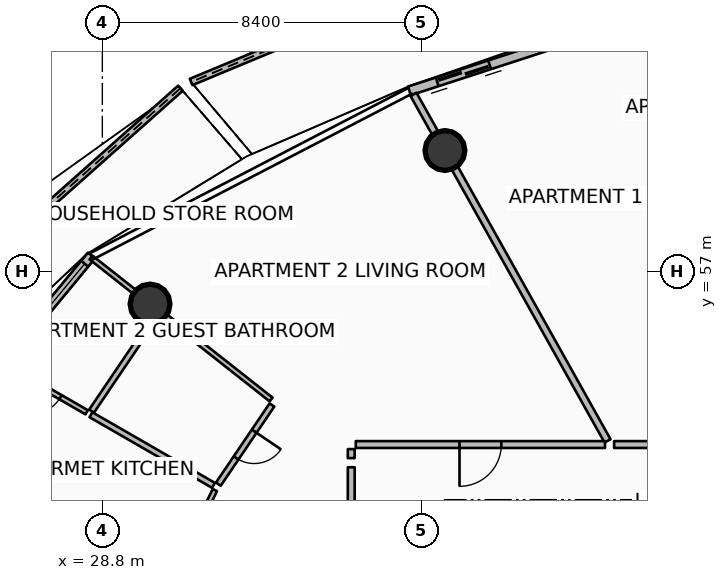
"""IFC4 building model, lengths in metres.
Left out: names, types, materials, properties, quantities, classifications, styles, units other than length and angle.
Written with IfcOpenShell. Run it as: python <this file> out.ifc"""

import sys

from ifc_helpers import new_model, si_unit, direction, frame, frame_2d, origin, origin_2d, place, context, subcontext, project, spatial, polyline, rectangle, circle, outline, extrude, element, fill, save


model = new_model("IFC4")
c1 = context("Model", 3, precision=1e-05, world=origin(), true_north=direction((0.0, 1.0)))
c2 = subcontext(c1, "Body", "Model", "MODEL_VIEW")
j1 = project(units=[si_unit("LENGTHUNIT", "METRE"), si_unit("PLANEANGLEUNIT", "RADIAN")], contexts=[c1])
p1 = place(None, origin())
s1 = spatial("IfcSite", under=j1, at=p1, CompositionType="ELEMENT")
p2 = place(p1, origin())
s2 = spatial("IfcBuilding", under=s1, at=p2, CompositionType="ELEMENT")
p3 = place(p2, frame((0.0, 0.0, 180.3)))
s3 = spatial("IfcBuildingStorey", under=s2, at=p3, CompositionType="ELEMENT", Elevation=180.3)
for number, where, z_axis, x_axis in (
    (1, (37.815, 60.186, 0.0), (0.0, 0.0, 1.0), (1.0, 0.0, 0.0)),
    (2, (30.056, 56.146, 0.0), (0.0, 0.0, 1.0), (1.0, 0.0, 0.0)),
):
    element("IfcColumn", number, at=place(p3, frame(where, z_axis=z_axis, x_axis=x_axis)), inside=s3, PredefinedType="COLUMN", context=c2, shape_type="SweptSolid", body=[
        extrude(circle(Radius=0.525, at=origin_2d()), origin(), (0.0, 0.0, 1.0), 3.5),
    ])
p4 = place(p3, frame((40.159, 65.745, 0.0), z_axis=(0.0, 0.0, 1.0), x_axis=(-0.923266030552, -0.38416121203, 0.0)))
e3 = element("IfcWall", 3, at=p4, inside=s3, PredefinedType="PARAPET", context=c2, shape_type="SweptSolid", body=[
    extrude(outline(polyline([(0.0, 0.0), (9.772, 0.0), (9.772, 1.756), (4.886, 1.853), (0.0, 1.832), (0.0, 0.0)])), frame((0.0, 0.09, 0.0), z_axis=(0.0, -1.0, 0.0), x_axis=(1.0, 0.0, 0.0)), (0.0, 0.0, 1.0), 0.18),
])
p5 = place(p3, frame((30.856, 61.827, 0.0), z_axis=(0.0, 0.0, 1.0), x_axis=(-0.747315583536, -0.664469275892, 0.0)))
e4 = element("IfcWall", 4, at=p5, inside=s3, PredefinedType="PARAPET", context=c2, shape_type="SweptSolid", body=[
    extrude(outline(polyline([(0.0, 0.0), (10.491, 0.0), (10.491, 1.348), (5.246, 1.562), (0.0, 1.747), (0.0, 0.0)])), frame((0.0, 0.09, 0.0), z_axis=(0.0, -1.0, 0.0), x_axis=(1.0, 0.0, 0.0)), (0.0, 0.0, 1.0), 0.18),
])
p6 = place(p3, frame((45.384, 64.519, 0.0), z_axis=(0.0, 0.0, 1.0), x_axis=(-0.951058543936, -0.309010753869, 0.0)))
e5 = element("IfcWall", 5, at=p6, inside=s3, PredefinedType="SOLIDWALL", context=c2, shape_type="SweptSolid", body=[
    extrude(rectangle(XDim=8.942, YDim=0.24, at=frame_2d((4.471, 0.0))), origin(), (0.0, 0.0, 1.0), 2.45),
])
p7 = place(p6, frame((6.722, 0.0, 0.0)))
e6 = element("IfcOpeningElement", 6, at=p7, cuts=e5, PredefinedType="OPENING", context=c2, shape_type="SweptSolid", body=[
    extrude(rectangle(XDim=1.45, YDim=2.15, at=frame_2d((0.725, 1.075))), frame((0.0, 0.13, 0.0), z_axis=(0.0, -1.0, 0.0), x_axis=(1.0, 0.0, 0.0)), (0.0, 0.0, 1.0), 0.26),
])
p8 = place(p6, frame((0.28, 0.0, 0.65)))
e7 = element("IfcOpeningElement", 7, at=p8, cuts=e5, PredefinedType="OPENING", context=c2, shape_type="SweptSolid", body=[
    extrude(rectangle(XDim=1.6, YDim=1.5, at=frame_2d((0.8, 0.75))), frame((0.0, 0.13, 0.0), z_axis=(0.0, -1.0, 0.0), x_axis=(1.0, 0.0, 0.0)), (0.0, 0.0, 1.0), 0.26),
])
p9 = place(p3, frame((28.515, 57.424, 0.0), z_axis=(0.0, 0.0, 1.0), x_axis=(-0.636759394418, -0.771062561418, 0.0)))
e8 = element("IfcWall", 8, at=p9, inside=s3, PredefinedType="SOLIDWALL", context=c2, shape_type="SweptSolid", body=[
    extrude(rectangle(XDim=10.494, YDim=0.24, at=frame_2d((5.247, 0.0))), origin(), (0.0, 0.0, 1.0), 2.45),
])
p10 = place(p9, frame((8.274, 0.0, 0.0)))
e9 = element("IfcOpeningElement", 9, at=p10, cuts=e8, PredefinedType="OPENING", context=c2, shape_type="SweptSolid", body=[
    extrude(rectangle(XDim=1.45, YDim=2.15, at=frame_2d((0.725, 1.075))), frame((0.0, 0.13, 0.0), z_axis=(0.0, -1.0, 0.0), x_axis=(1.0, 0.0, 0.0)), (0.0, 0.0, 1.0), 0.26),
])
p11 = place(p9, frame((0.28, 0.0, 0.65)))
e10 = element("IfcOpeningElement", 10, at=p11, cuts=e8, PredefinedType="OPENING", context=c2, shape_type="SweptSolid", body=[
    extrude(rectangle(XDim=1.6, YDim=1.5, at=frame_2d((0.8, 0.75))), frame((0.0, 0.13, 0.0), z_axis=(0.0, -1.0, 0.0), x_axis=(1.0, 0.0, 0.0)), (0.0, 0.0, 1.0), 0.26),
])
p12 = place(p3, frame((42.094, 52.546, 0.0), z_axis=(0.0, 0.0, 1.0), x_axis=(-0.488614041717, 0.872500039104, 0.0)))
e11 = element("IfcWall", 11, at=p12, inside=s3, PredefinedType="PARTITIONING", context=c2, shape_type="SweptSolid", body=[
    extrude(rectangle(XDim=10.448, YDim=0.18, at=frame_2d((5.224, 0.0))), origin(), (0.0, 0.0, 1.0), 2.94),
])
p13 = place(p3, frame((46.643, 52.45, 0.0), z_axis=(0.0, 0.0, 1.0), x_axis=(-1.0, 0.0, 0.0)))
e12 = element("IfcWall", 12, at=p13, inside=s3, PredefinedType="PARTITIONING", context=c2, shape_type="SweptSolid", body=[
    extrude(rectangle(XDim=4.376, YDim=0.18, at=frame_2d((2.188, 0.0))), origin(), (0.0, 0.0, 1.0), 2.94),
])
p14 = place(p13, frame((1.638, 0.0, 0.0)))
e13 = element("IfcOpeningElement", 13, at=p14, cuts=e12, PredefinedType="OPENING", context=c2, shape_type="SweptSolid", body=[
    extrude(rectangle(XDim=1.1, YDim=2.1, at=frame_2d((0.55, 1.05))), frame((0.0, 0.1, 0.0), z_axis=(0.0, -1.0, 0.0), x_axis=(1.0, 0.0, 0.0)), (0.0, 0.0, 1.0), 0.2),
])
p15 = place(p3, frame((42.028, 52.45, 0.0), z_axis=(0.0, 0.0, 1.0), x_axis=(-1.0, 0.0, 0.0)))
e14 = element("IfcWall", 14, at=p15, inside=s3, PredefinedType="PARTITIONING", context=c2, shape_type="SweptSolid", body=[
    extrude(rectangle(XDim=6.558, YDim=0.18, at=frame_2d((3.279, 0.0))), origin(), (0.0, 0.0, 1.0), 2.94),
])
p16 = place(p15, frame((2.729, 0.0, 0.0)))
e15 = element("IfcOpeningElement", 15, at=p16, cuts=e14, PredefinedType="OPENING", context=c2, shape_type="SweptSolid", body=[
    extrude(rectangle(XDim=1.1, YDim=2.1, at=frame_2d((0.55, 1.05))), frame((0.0, 0.1, 0.0), z_axis=(0.0, -1.0, 0.0), x_axis=(1.0, 0.0, 0.0)), (0.0, 0.0, 1.0), 0.2),
])
p17 = place(p3, frame((35.35, 52.33, 0.0), z_axis=(0.0, 0.0, 1.0), x_axis=(0.0, -1.0, 0.0)))
e16 = element("IfcWall", 16, at=p17, inside=s3, PredefinedType="PARTITIONING", context=c2, shape_type="SweptSolid", body=[
    extrude(rectangle(XDim=0.238, YDim=0.18, at=frame_2d((0.119, 0.0))), origin(), (0.0, 0.0, 1.0), 2.94),
])
p18 = place(p3, frame((35.35, 51.853, 0.0), z_axis=(0.0, 0.0, 1.0), x_axis=(0.0, -1.0, 0.0)))
e17 = element("IfcWall", 17, at=p18, inside=s3, PredefinedType="PARTITIONING", context=c2, shape_type="SweptSolid", body=[
    extrude(rectangle(XDim=6.165, YDim=0.18, at=frame_2d((3.083, 0.0))), origin(), (0.0, 0.0, 1.0), 2.94),
])
p19 = place(p3, frame((33.241, 53.635, 0.0), z_axis=(0.0, 0.0, 1.0), x_axis=(-0.785321754625, 0.619087830371, 0.0)))
e18 = element("IfcWall", 18, at=p19, inside=s3, PredefinedType="PARTITIONING", context=c2, shape_type="SweptSolid", body=[
    extrude(rectangle(XDim=6.033, YDim=0.125, at=frame_2d((3.017, 0.0))), origin(), (0.0, 0.0, 1.0), 2.94),
])
p20 = place(p3, frame((33.263, 53.49, 0.0), z_axis=(0.0, 0.0, 1.0), x_axis=(-0.560597119889, -0.828088684364, 0.0)))
e19 = element("IfcWall", 19, at=p20, inside=s3, PredefinedType="PARTITIONING", context=c2, shape_type="SweptSolid", body=[
    extrude(rectangle(XDim=2.516, YDim=0.15, at=frame_2d((1.258, 0.0))), origin(), (0.0, 0.0, 1.0), 2.94),
])
p21 = place(p20, frame((0.833, 0.0, 0.0)))
e20 = element("IfcOpeningElement", 20, at=p21, cuts=e19, PredefinedType="OPENING", context=c2, shape_type="SweptSolid", body=[
    extrude(rectangle(XDim=0.85, YDim=2.06, at=frame_2d((0.425, 1.03))), frame((0.0, 0.085, 0.0), z_axis=(0.0, -1.0, 0.0), x_axis=(1.0, 0.0, 0.0)), (0.0, 0.0, 1.0), 0.17),
])
p22 = place(p3, frame((30.24, 55.874, 0.0), z_axis=(0.0, 0.0, 1.0), x_axis=(-0.560588198731, -0.828094723714, 0.0)))
e21 = element("IfcWall", 21, at=p22, inside=s3, PredefinedType="PARTITIONING", context=c2, shape_type="SweptSolid", body=[
    extrude(rectangle(XDim=3.074, YDim=0.15, at=frame_2d((1.537, 0.0))), origin(), (0.0, 0.0, 1.0), 2.94),
])
p23 = place(p3, frame((31.724, 51.377, 0.0), z_axis=(0.0, 0.0, 1.0), x_axis=(-0.866501175841, 0.499175031693, 0.0)))
e22 = element("IfcWall", 22, at=p23, inside=s3, PredefinedType="PARTITIONING", context=c2, shape_type="SweptSolid", body=[
    extrude(rectangle(XDim=3.72, YDim=0.15, at=frame_2d((1.86, 0.0))), origin(), (0.0, 0.0, 1.0), 2.94),
])
p24 = place(p3, frame((28.388, 53.299, 0.0), z_axis=(0.0, 0.0, 1.0), x_axis=(-0.866470316497, 0.499228595565, 0.0)))
e23 = element("IfcWall", 23, at=p24, inside=s3, PredefinedType="PARTITIONING", context=c2, shape_type="SweptSolid", body=[
    extrude(rectangle(XDim=2.44, YDim=0.125, at=frame_2d((1.22, 0.0))), origin(), (0.0, 0.0, 1.0), 2.94),
])
p25 = place(p24, frame((0.795, 0.0, 0.0)))
e24 = element("IfcOpeningElement", 24, at=p25, cuts=e23, PredefinedType="OPENING", context=c2, shape_type="SweptSolid", body=[
    extrude(rectangle(XDim=0.85, YDim=2.06, at=frame_2d((0.425, 1.03))), frame((0.0, 0.073, 0.0), z_axis=(0.0, -1.0, 0.0), x_axis=(1.0, 0.0, 0.0)), (0.0, 0.0, 1.0), 0.145),
])
p26 = place(p3, frame((30.627, 49.143, 0.0), z_axis=(0.0, 0.0, 1.0), x_axis=(-0.92485745631, 0.380313930205, 0.0)))
e25 = element("IfcWall", 25, at=p26, inside=s3, PredefinedType="PARTITIONING", context=c2, shape_type="SweptSolid", body=[
    extrude(rectangle(XDim=7.1, YDim=0.125, at=frame_2d((3.55, 0.0))), origin(), (0.0, 0.0, 1.0), 2.94),
])
p27 = place(p3, frame((31.762, 51.251, 0.0), z_axis=(0.0, 0.0, 1.0), x_axis=(-0.440639073568, -0.897684358138, 0.0)))
e26 = element("IfcWall", 26, at=p27, inside=s3, PredefinedType="PARTITIONING", context=c2, shape_type="SweptSolid", body=[
    extrude(rectangle(XDim=2.307, YDim=0.125, at=frame_2d((1.153, 0.0))), origin(), (0.0, 0.0, 1.0), 2.94),
])
p28 = place(p27, frame((0.728, 0.0, 0.0)))
e27 = element("IfcOpeningElement", 27, at=p28, cuts=e26, PredefinedType="OPENING", context=c2, shape_type="SweptSolid", body=[
    extrude(rectangle(XDim=0.85, YDim=2.06, at=frame_2d((0.425, 1.03))), frame((0.0, 0.073, 0.0), z_axis=(0.0, -1.0, 0.0), x_axis=(1.0, 0.0, 0.0)), (0.0, 0.0, 1.0), 0.145),
])
p29 = place(p7, origin())
e28 = element("IfcDoor", 28, at=p29, inside=s3, OperationType="DOUBLE_DOOR_SLIDING", PredefinedType="DOOR", context=c2, shape_type="SweptSolid", body=[
    extrude(rectangle(XDim=1.45, YDim=2.15, at=frame_2d((0.725, 1.075))), frame((0.0, 0.025, 0.0), z_axis=(0.0, -1.0, 0.0), x_axis=(1.0, 0.0, 0.0)), (0.0, 0.0, 1.0), 0.05),
])
fill(e6, e28)
p30 = place(p11, origin())
e29 = element("IfcWindow", 29, at=p30, inside=s3, PartitioningType="SINGLE_PANEL", PredefinedType="WINDOW", context=c2, shape_type="SweptSolid", body=[
    extrude(rectangle(XDim=1.6, YDim=1.5, at=frame_2d((0.8, 0.75))), frame((0.0, 0.03, 0.0), z_axis=(0.0, -1.0, 0.0), x_axis=(1.0, 0.0, 0.0)), (0.0, 0.0, 1.0), 0.06),
])
fill(e10, e29)
p31 = place(p16, origin())
e30 = element("IfcDoor", 30, at=p31, inside=s3, OperationType="SINGLE_SWING_RIGHT", PredefinedType="DOOR", context=c2, shape_type="SweptSolid", body=[
    extrude(rectangle(XDim=1.1, YDim=2.1, at=frame_2d((0.55, 1.05))), frame((0.0, 0.025, 0.0), z_axis=(0.0, -1.0, 0.0), x_axis=(1.0, 0.0, 0.0)), (0.0, 0.0, 1.0), 0.05),
])
fill(e15, e30)
p32 = place(p21, origin())
e31 = element("IfcDoor", 31, at=p32, inside=s3, OperationType="SINGLE_SWING_LEFT", PredefinedType="DOOR", context=c2, shape_type="SweptSolid", body=[
    extrude(rectangle(XDim=0.85, YDim=2.06, at=frame_2d((0.425, 1.03))), frame((0.0, 0.025, 0.0), z_axis=(0.0, -1.0, 0.0), x_axis=(1.0, 0.0, 0.0)), (0.0, 0.0, 1.0), 0.05),
])
fill(e20, e31)
p33 = place(p25, origin())
e32 = element("IfcDoor", 32, at=p33, inside=s3, OperationType="SINGLE_SWING_RIGHT", PredefinedType="DOOR", context=c2, shape_type="SweptSolid", body=[
    extrude(rectangle(XDim=0.85, YDim=2.06, at=frame_2d((0.425, 1.03))), frame((0.0, 0.025, 0.0), z_axis=(0.0, -1.0, 0.0), x_axis=(1.0, 0.0, 0.0)), (0.0, 0.0, 1.0), 0.05),
])
fill(e24, e32)
save(model, sys.argv[1])
